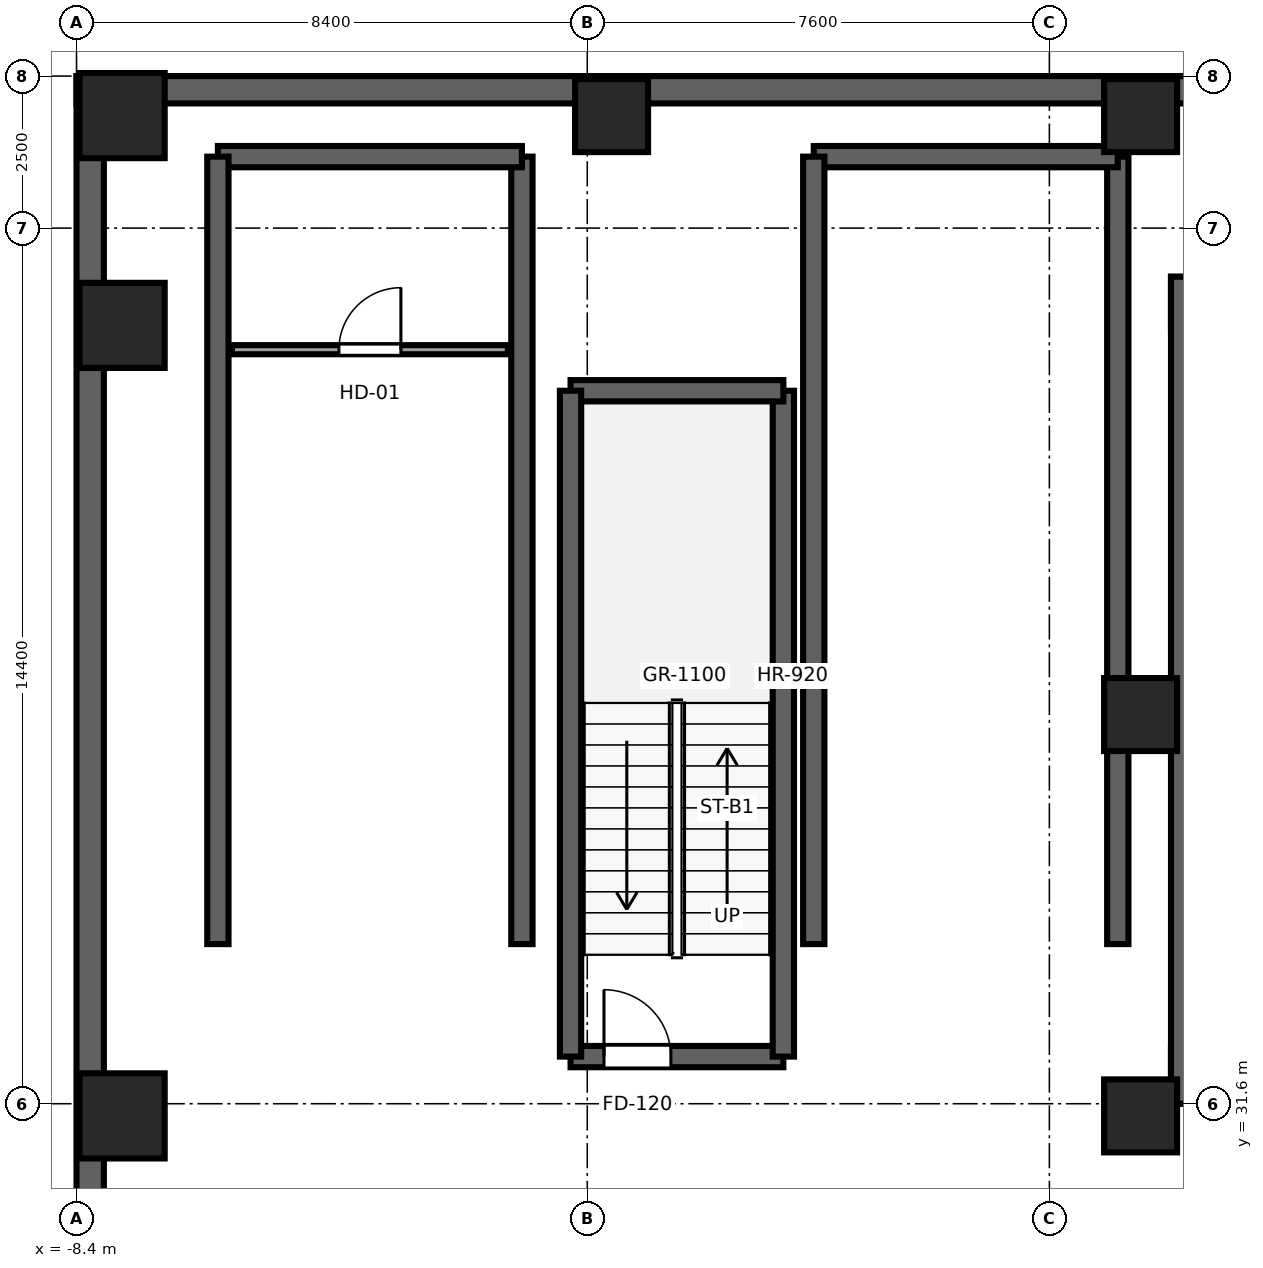
"""IFC4 building model, lengths in metres.
Left out: names, types, materials, properties, quantities, classifications, styles, units other than length and angle.
Written with IfcOpenShell. Run it as: python <this file> out.ifc"""

import sys

from ifc_helpers import new_model, si_unit, direction, frame, frame_2d, origin, origin_2d, place, context, subcontext, project, spatial, rectangle, extrude, source, transform, mapped, element, fill, save


model = new_model("IFC4")
c1 = context("Model", 3, precision=1e-05, world=origin(), true_north=direction((0.0, 1.0)))
c2 = subcontext(c1, "Body", "Model", "MODEL_VIEW")
j1 = project(units=[si_unit("LENGTHUNIT", "METRE"), si_unit("PLANEANGLEUNIT", "RADIAN")], contexts=[c1])
p1 = place(None, origin())
s1 = spatial("IfcSite", under=j1, at=p1, CompositionType="ELEMENT")
p2 = place(p1, origin())
s2 = spatial("IfcBuilding", under=s1, at=p2, CompositionType="ELEMENT")
p3 = place(p2, frame((0.0, 0.0, -4.8)))
s3 = spatial("IfcBuildingStorey", under=s2, at=p3, CompositionType="ELEMENT", Elevation=-4.8)
p4 = place(p3, frame((9.6, 32.05, 0.0), z_axis=(0.0, 0.0, 1.0), x_axis=(1.0, 0.0, 0.0)))
e1 = element("IfcWall", 1, at=p4, inside=s3, PredefinedType="SHEAR", context=c2, shape_type="SweptSolid", body=[
    extrude(rectangle(XDim=26.8, YDim=0.9, at=frame_2d((13.4, 0.0))), origin(), (0.0, 0.0, 1.0), 4.8),
])
p5 = place(p4, frame((7.85, 0.0, 0.0), z_axis=(0.0, 0.0, 1.0), x_axis=(-1.0, 0.0, 0.0)))
e2 = element("IfcOpeningElement", 2, at=p5, cuts=e1, PredefinedType="OPENING", context=c2, shape_type="SweptSolid", body=[
    extrude(rectangle(XDim=1.5, YDim=2.04, at=frame_2d((0.75, 1.02))), frame((0.0, 0.46, 0.0), z_axis=(0.0, -1.0, 0.0), x_axis=(1.0, 0.0, 0.0)), (0.0, 0.0, 1.0), 0.92),
])
p6 = place(p4, frame((14.15, 0.0, 0.0), z_axis=(0.0, 0.0, 1.0), x_axis=(-1.0, 0.0, 0.0)))
e3 = element("IfcOpeningElement", 3, at=p6, cuts=e1, PredefinedType="OPENING", context=c2, shape_type="SweptSolid", body=[
    extrude(rectangle(XDim=1.5, YDim=2.04, at=frame_2d((0.75, 1.02))), frame((0.0, 0.46, 0.0), z_axis=(0.0, -1.0, 0.0), x_axis=(1.0, 0.0, 0.0)), (0.0, 0.0, 1.0), 0.92),
])
p7 = place(p4, frame((21.25, 0.0, 0.0), z_axis=(0.0, 0.0, 1.0), x_axis=(-1.0, 0.0, 0.0)))
e4 = element("IfcOpeningElement", 4, at=p7, cuts=e1, PredefinedType="OPENING", context=c2, shape_type="SweptSolid", body=[
    extrude(rectangle(XDim=1.5, YDim=2.04, at=frame_2d((0.75, 1.02))), frame((0.0, 0.46, 0.0), z_axis=(0.0, -1.0, 0.0), x_axis=(1.0, 0.0, 0.0)), (0.0, 0.0, 1.0), 0.92),
])
p8 = place(p3, frame((9.6, 44.75, 0.0), z_axis=(0.0, 0.0, 1.0), x_axis=(1.0, 0.0, 0.0)))
e5 = element("IfcWall", 5, at=p8, inside=s3, PredefinedType="SHEAR", context=c2, shape_type="SweptSolid", body=[
    extrude(rectangle(XDim=26.8, YDim=0.9, at=frame_2d((13.4, 0.0))), origin(), (0.0, 0.0, 1.0), 4.8),
])
p9 = place(p3, frame((10.05, 31.6, 0.0), z_axis=(0.0, 0.0, 1.0), x_axis=(0.0, 1.0, 0.0)))
e6 = element("IfcWall", 6, at=p9, inside=s3, PredefinedType="SHEAR", context=c2, shape_type="SweptSolid", body=[
    extrude(rectangle(XDim=13.6, YDim=0.9, at=frame_2d((6.8, 0.0))), origin(), (0.0, 0.0, 1.0), 4.8),
])
p10 = place(p3, frame((-0.275, 32.375, 0.0), z_axis=(0.0, 0.0, 1.0), x_axis=(1.0, 0.0, 0.0)))
e7 = element("IfcWall", 7, at=p10, inside=s3, PredefinedType="SHEAR", context=c2, shape_type="SweptSolid", body=[
    extrude(rectangle(XDim=3.5, YDim=0.35, at=frame_2d((1.75, 0.0))), origin(), (0.0, 0.0, 1.0), 4.8),
])
p11 = place(p10, frame((0.55, 0.0, 0.0)))
e8 = element("IfcOpeningElement", 8, at=p11, cuts=e7, PredefinedType="OPENING", context=c2, shape_type="SweptSolid", body=[
    extrude(rectangle(XDim=1.1, YDim=2.12, at=frame_2d((0.55, 1.06))), frame((0.0, 0.185, 0.0), z_axis=(0.0, -1.0, 0.0), x_axis=(1.0, 0.0, 0.0)), (0.0, 0.0, 1.0), 0.37),
])
p12 = place(p3, frame((3.225, 32.375, 0.0), z_axis=(0.0, 0.0, 1.0), x_axis=(0.0, 1.0, 0.0)))
e9 = element("IfcWall", 9, at=p12, inside=s3, PredefinedType="SHEAR", context=c2, shape_type="SweptSolid", body=[
    extrude(rectangle(XDim=10.95, YDim=0.35, at=frame_2d((5.475, 0.0))), origin(), (0.0, 0.0, 1.0), 4.8),
])
p13 = place(p3, frame((3.225, 43.325, 0.0), z_axis=(0.0, 0.0, 1.0), x_axis=(-1.0, 0.0, 0.0)))
e10 = element("IfcWall", 10, at=p13, inside=s3, PredefinedType="SHEAR", context=c2, shape_type="SweptSolid", body=[
    extrude(rectangle(XDim=3.5, YDim=0.35, at=frame_2d((1.75, 0.0))), origin(), (0.0, 0.0, 1.0), 4.8),
])
p14 = place(p3, frame((-0.275, 43.325, 0.0), z_axis=(0.0, 0.0, 1.0), x_axis=(0.0, -1.0, 0.0)))
e11 = element("IfcWall", 11, at=p14, inside=s3, PredefinedType="SHEAR", context=c2, shape_type="SweptSolid", body=[
    extrude(rectangle(XDim=10.95, YDim=0.35, at=frame_2d((5.475, 0.0))), origin(), (0.0, 0.0, 1.0), 4.8),
])
p15 = place(p3, frame((-1.075, 34.225, 0.0), z_axis=(0.0, 0.0, 1.0), x_axis=(0.0, 1.0, 0.0)))
e12 = element("IfcWall", 12, at=p15, inside=s3, PredefinedType="SHEAR", context=c2, shape_type="SweptSolid", body=[
    extrude(rectangle(XDim=12.95, YDim=0.35, at=frame_2d((6.475, 0.0))), origin(), (0.0, 0.0, 1.0), 4.8),
])
p16 = place(p3, frame((-1.075, 47.175, 0.0), z_axis=(0.0, 0.0, 1.0), x_axis=(-1.0, 0.0, 0.0)))
e13 = element("IfcWall", 13, at=p16, inside=s3, PredefinedType="SHEAR", context=c2, shape_type="SweptSolid", body=[
    extrude(rectangle(XDim=5.0, YDim=0.35, at=frame_2d((2.5, 0.0))), origin(), (0.0, 0.0, 1.0), 4.8),
])
for number, where, z_axis, x_axis in (
    (14, (-6.075, 47.175, 0.0), (0.0, 0.0, 1.0), (0.0, -1.0, 0.0)),
    (15, (8.725, 34.225, 0.0), (0.0, 0.0, 1.0), (0.0, 1.0, 0.0)),
):
    element("IfcWall", number, at=place(p3, frame(where, z_axis=z_axis, x_axis=x_axis)), inside=s3, PredefinedType="SHEAR", context=c2, shape_type="SweptSolid", body=[
        extrude(rectangle(XDim=12.95, YDim=0.35, at=frame_2d((6.475, 0.0))), origin(), (0.0, 0.0, 1.0), 4.8),
    ])
p17 = place(p3, frame((8.725, 47.175, 0.0), z_axis=(0.0, 0.0, 1.0), x_axis=(-1.0, 0.0, 0.0)))
e16 = element("IfcWall", 16, at=p17, inside=s3, PredefinedType="SHEAR", context=c2, shape_type="SweptSolid", body=[
    extrude(rectangle(XDim=5.0, YDim=0.35, at=frame_2d((2.5, 0.0))), origin(), (0.0, 0.0, 1.0), 4.8),
])
p18 = place(p3, frame((3.725, 47.175, 0.0), z_axis=(0.0, 0.0, 1.0), x_axis=(0.0, -1.0, 0.0)))
e17 = element("IfcWall", 17, at=p18, inside=s3, PredefinedType="SHEAR", context=c2, shape_type="SweptSolid", body=[
    extrude(rectangle(XDim=12.95, YDim=0.35, at=frame_2d((6.475, 0.0))), origin(), (0.0, 0.0, 1.0), 4.8),
])
p19 = place(p3, frame((-8.4, 48.275, 0.0), z_axis=(0.0, 0.0, 1.0), x_axis=(1.0, 0.0, 0.0)))
e18 = element("IfcWall", 18, at=p19, inside=s3, PredefinedType="SOLIDWALL", context=c2, shape_type="SweptSolid", body=[
    extrude(rectangle(XDim=73.8, YDim=0.45, at=frame_2d((36.9, 0.0))), origin(), (0.0, 0.0, 1.0), 4.8),
])
p20 = place(p3, frame((-8.175, -2.5, 0.0), z_axis=(0.0, 0.0, 1.0), x_axis=(0.0, 1.0, 0.0)))
e19 = element("IfcWall", 19, at=p20, inside=s3, PredefinedType="SOLIDWALL", context=c2, shape_type="SweptSolid", body=[
    extrude(rectangle(XDim=51.0, YDim=0.45, at=frame_2d((25.5, 0.0))), origin(), (0.0, 0.0, 1.0), 4.8),
])
m1 = source(origin(), c2, "Body", "SweptSolid", [
    extrude(rectangle(XDim=1.4, YDim=1.4, at=origin_2d()), origin(), (0.0, 0.0, 1.0), 4.8),
])
for number, where, z_axis, x_axis in (
    (20, (-7.65, 31.4, 0.0), (0.0, 0.0, 1.0), (1.0, 0.0, 0.0)),
    (21, (-7.65, 44.4, 0.0), (0.0, 0.0, 1.0), (1.0, 0.0, 0.0)),
    (22, (-7.65, 47.85, 0.0), (0.0, 0.0, 1.0), (1.0, 0.0, 0.0)),
):
    element("IfcColumn", number, at=place(p3, frame(where, z_axis=z_axis, x_axis=x_axis)), inside=s3, PredefinedType="COLUMN", context=c2, shape_type="MappedRepresentation", body=[
        mapped(m1, transform((0.0, 0.0, 0.0), x_axis=(1.0, 0.0, 0.0), y_axis=(0.0, 1.0, 0.0), z_axis=(0.0, 0.0, 1.0), scale=1.0)),
    ])
m2 = source(origin(), c2, "Body", "SweptSolid", [
    extrude(rectangle(XDim=1.2, YDim=1.2, at=origin_2d()), origin(), (0.0, 0.0, 1.0), 4.8),
])
for number, where, z_axis, x_axis in (
    (23, (0.4, 47.85, 0.0), (0.0, 0.0, 1.0), (1.0, 0.0, 0.0)),
    (24, (9.1, 47.85, 0.0), (0.0, 0.0, 1.0), (1.0, 0.0, 0.0)),
    (25, (9.1, 38.0, 0.0), (0.0, 0.0, 1.0), (1.0, 0.0, 0.0)),
    (26, (9.1, 31.4, 0.0), (0.0, 0.0, 1.0), (1.0, 0.0, 0.0)),
):
    element("IfcColumn", number, at=place(p3, frame(where, z_axis=z_axis, x_axis=x_axis)), inside=s3, PredefinedType="COLUMN", context=c2, shape_type="MappedRepresentation", body=[
        mapped(m2, transform((0.0, 0.0, 0.0), x_axis=(1.0, 0.0, 0.0), y_axis=(0.0, 1.0, 0.0), z_axis=(0.0, 0.0, 1.0), scale=1.0)),
    ])
p21 = place(p3, frame((-5.845, 44.0, 0.0), z_axis=(0.0, 0.0, 1.0), x_axis=(1.0, 0.0, 0.0)))
e27 = element("IfcWall", 27, at=p21, inside=s3, PredefinedType="PARTITIONING", context=c2, shape_type="SweptSolid", body=[
    extrude(rectangle(XDim=4.54, YDim=0.15, at=frame_2d((2.27, 0.0))), origin(), (0.0, 0.0, 1.0), 4.54),
])
p22 = place(p21, frame((1.76, 0.0, 0.0)))
e28 = element("IfcOpeningElement", 28, at=p22, cuts=e27, PredefinedType="OPENING", context=c2, shape_type="SweptSolid", body=[
    extrude(rectangle(XDim=1.02, YDim=2.03, at=frame_2d((0.51, 1.015))), frame((0.0, 0.085, 0.0), z_axis=(0.0, -1.0, 0.0), x_axis=(1.0, 0.0, 0.0)), (0.0, 0.0, 1.0), 0.17),
])
m3 = source(origin(), c2, "Body", "SweptSolid", [
    extrude(rectangle(XDim=1.1, YDim=2.12, at=frame_2d((0.55, 1.06))), frame((0.0, 0.025, 0.0), z_axis=(0.0, -1.0, 0.0), x_axis=(1.0, 0.0, 0.0)), (0.0, 0.0, 1.0), 0.05),
])
p23 = place(p11, origin())
e29 = element("IfcDoor", 29, at=p23, inside=s3, OperationType="SINGLE_SWING_LEFT", PredefinedType="DOOR", context=c2, shape_type="MappedRepresentation", body=[
    mapped(m3, transform((0.0, 0.0, 0.0), x_axis=(1.0, 0.0, 0.0), y_axis=(0.0, 1.0, 0.0), z_axis=(0.0, 0.0, 1.0), scale=1.0)),
])
fill(e8, e29)
m4 = source(origin(), c2, "Body", "SweptSolid", [
    extrude(rectangle(XDim=1.02, YDim=2.03, at=frame_2d((0.51, 1.015))), frame((0.0, 0.025, 0.0), z_axis=(0.0, -1.0, 0.0), x_axis=(1.0, 0.0, 0.0)), (0.0, 0.0, 1.0), 0.05),
])
p24 = place(p22, origin())
e30 = element("IfcDoor", 30, at=p24, inside=s3, OperationType="SINGLE_SWING_RIGHT", PredefinedType="DOOR", context=c2, shape_type="MappedRepresentation", body=[
    mapped(m4, transform((0.0, 0.0, 0.0), x_axis=(1.0, 0.0, 0.0), y_axis=(0.0, 1.0, 0.0), z_axis=(0.0, 0.0, 1.0), scale=1.0)),
])
fill(e28, e30)
save(model, sys.argv[1])
